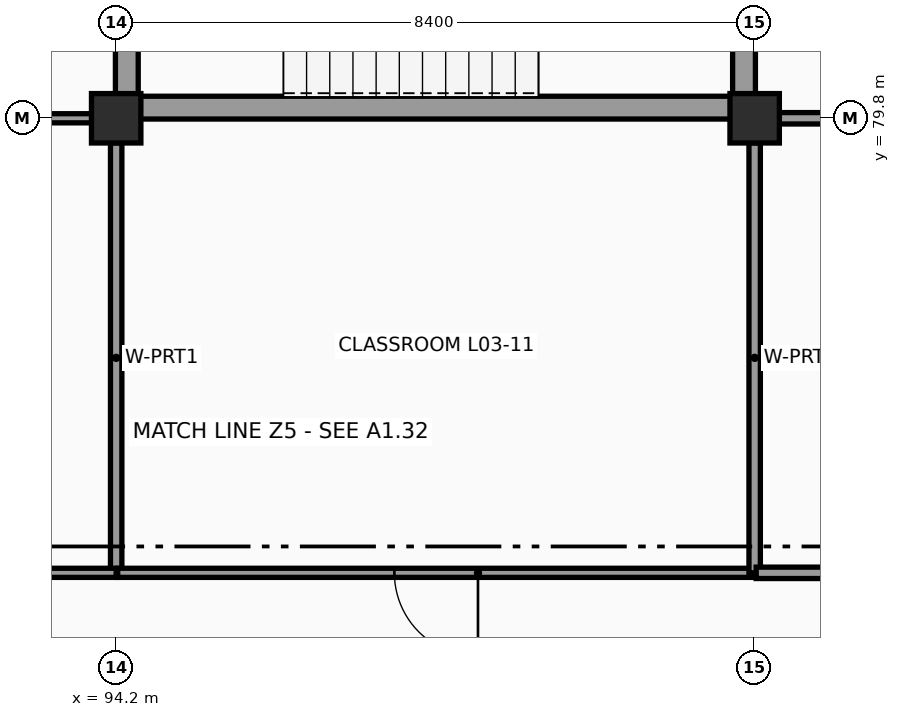
"""IFC4 building model, lengths in metres.
Left out: names, types, materials, properties, quantities, classifications, styles, units other than length and angle.
Written with IfcOpenShell. Run it as: python <this file> out.ifc"""

import sys

from ifc_helpers import new_model, si_unit, direction, frame, frame_2d, origin, origin_2d, place, context, subcontext, project, spatial, rectangle, extrude, element, fill, save


model = new_model("IFC4")
c1 = context("Model", 3, precision=1e-05, world=origin(), true_north=direction((0.0, 1.0)))
c2 = subcontext(c1, "Body", "Model", "MODEL_VIEW")
j1 = project(units=[si_unit("LENGTHUNIT", "METRE"), si_unit("PLANEANGLEUNIT", "RADIAN")], contexts=[c1])
p1 = place(None, origin())
s1 = spatial("IfcSite", under=j1, at=p1, CompositionType="ELEMENT")
p2 = place(p1, origin())
s2 = spatial("IfcBuilding", under=s1, at=p2, CompositionType="ELEMENT")
p3 = place(p2, frame((0.0, 0.0, 11.4)))
s3 = spatial("IfcBuildingStorey", under=s2, at=p3, CompositionType="ELEMENT", Elevation=11.4)
for number, where, z_axis, x_axis in (
    (1, (94.2, 79.8, 0.0), (0.0, 0.0, 1.0), (1.0, 0.0, 0.0)),
    (2, (102.6, 79.8, 0.0), (0.0, 0.0, 1.0), (1.0, 0.0, 0.0)),
):
    element("IfcColumn", number, at=place(p3, frame(where, z_axis=z_axis, x_axis=x_axis)), inside=s3, PredefinedType="COLUMN", context=c2, shape_type="SweptSolid", body=[
        extrude(rectangle(XDim=0.65, YDim=0.65, at=origin_2d()), origin(), (0.0, 0.0, 1.0), 3.6),
    ])
p4 = place(p3, frame((94.34, 79.94, 0.0), z_axis=(0.0, 0.0, 1.0), x_axis=(1.0, 0.0, 0.0)))
e3 = element("IfcWall", 3, at=p4, inside=s3, PredefinedType="SHEAR", context=c2, shape_type="SweptSolid", body=[
    extrude(rectangle(XDim=8.12, YDim=0.3, at=frame_2d((4.06, 0.0))), origin(), (0.0, 0.0, 1.0), 3.6),
])
for number, where, z_axis, x_axis in (
    (4, (102.46, 79.94, 0.0), (0.0, 0.0, 1.0), (0.0, 1.0, 0.0)),
    (5, (94.34, 84.22, 0.0), (0.0, 0.0, 1.0), (0.0, -1.0, 0.0)),
):
    element("IfcWall", number, at=place(p3, frame(where, z_axis=z_axis, x_axis=x_axis)), inside=s3, PredefinedType="SHEAR", context=c2, shape_type="SweptSolid", body=[
        extrude(rectangle(XDim=4.28, YDim=0.3, at=frame_2d((2.14, 0.0))), origin(), (0.0, 0.0, 1.0), 3.6),
    ])
p5 = place(p3, frame((106.8, 79.8, 0.0), z_axis=(0.0, 0.0, 1.0), x_axis=(-1.0, 0.0, 0.0)))
e6 = element("IfcWall", 6, at=p5, inside=s3, PredefinedType="PARTITIONING", context=c2, shape_type="SweptSolid", body=[
    extrude(rectangle(XDim=3.877, YDim=0.15, at=frame_2d((1.938, 0.0))), origin(), (0.0, 0.0, 1.0), 2.59),
])
p6 = place(p3, frame((86.123, 79.8, 0.0), z_axis=(0.0, 0.0, 1.0), x_axis=(1.0, 0.0, 0.0)))
e7 = element("IfcWall", 7, at=p6, inside=s3, PredefinedType="PARTITIONING", context=c2, shape_type="SweptSolid", body=[
    extrude(rectangle(XDim=7.754, YDim=0.12, at=frame_2d((3.877, 0.0))), origin(), (0.0, 0.0, 1.0), 2.59),
])
p7 = place(p3, frame((94.2, 79.477, 0.0), z_axis=(0.0, 0.0, 1.0), x_axis=(0.0, -1.0, 0.0)))
e8 = element("IfcWall", 8, at=p7, inside=s3, PredefinedType="PARTITIONING", context=c2, shape_type="SweptSolid", body=[
    extrude(rectangle(XDim=5.657, YDim=0.15, at=frame_2d((2.829, 0.0))), origin(), (0.0, 0.0, 1.0), 2.74),
])
p8 = place(p3, frame((94.2, 73.82, 0.0), z_axis=(0.0, 0.0, 1.0), x_axis=(-1.0, 0.0, 0.0)))
e9 = element("IfcWall", 9, at=p8, inside=s3, PredefinedType="PARTITIONING", context=c2, shape_type="SweptSolid", body=[
    extrude(rectangle(XDim=8.4, YDim=0.12, at=frame_2d((4.2, 0.0))), origin(), (0.0, 0.0, 1.0), 2.69),
])
p9 = place(p3, frame((102.6, 73.82, 0.0), z_axis=(0.0, 0.0, 1.0), x_axis=(-1.0, 0.0, 0.0)))
e10 = element("IfcWall", 10, at=p9, inside=s3, PredefinedType="PARTITIONING", context=c2, shape_type="SweptSolid", body=[
    extrude(rectangle(XDim=8.38, YDim=0.12, at=frame_2d((4.19, 0.0))), origin(), (0.0, 0.0, 1.0), 2.74),
])
p10 = place(p9, frame((3.64, 0.0, 0.0)))
e11 = element("IfcOpeningElement", 11, at=p10, cuts=e10, PredefinedType="OPENING", context=c2, shape_type="SweptSolid", body=[
    extrude(rectangle(XDim=1.1, YDim=2.1, at=frame_2d((0.55, 1.05))), frame((0.0, 0.07, 0.0), z_axis=(0.0, -1.0, 0.0), x_axis=(1.0, 0.0, 0.0)), (0.0, 0.0, 1.0), 0.14),
])
p11 = place(p3, frame((102.6, 79.477, 0.0), z_axis=(0.0, 0.0, 1.0), x_axis=(0.0, -1.0, 0.0)))
e12 = element("IfcWall", 12, at=p11, inside=s3, PredefinedType="PARTITIONING", context=c2, shape_type="SweptSolid", body=[
    extrude(rectangle(XDim=5.657, YDim=0.15, at=frame_2d((2.829, 0.0))), origin(), (0.0, 0.0, 1.0), 2.94),
])
p12 = place(p3, frame((110.577, 73.82, 0.0), z_axis=(0.0, 0.0, 1.0), x_axis=(-1.0, 0.0, 0.0)))
e13 = element("IfcWall", 13, at=p12, inside=s3, PredefinedType="PARTITIONING", context=c2, shape_type="SweptSolid", body=[
    extrude(rectangle(XDim=7.957, YDim=0.15, at=frame_2d((3.979, 0.0))), origin(), (0.0, 0.0, 1.0), 2.94),
])
p13 = place(p10, origin())
e14 = element("IfcDoor", 14, at=p13, inside=s3, OperationType="SINGLE_SWING_LEFT", PredefinedType="DOOR", context=c2, shape_type="SweptSolid", body=[
    extrude(rectangle(XDim=1.1, YDim=2.1, at=frame_2d((0.55, 1.05))), frame((0.0, 0.025, 0.0), z_axis=(0.0, -1.0, 0.0), x_axis=(1.0, 0.0, 0.0)), (0.0, 0.0, 1.0), 0.05),
])
fill(e11, e14)
save(model, sys.argv[1])
